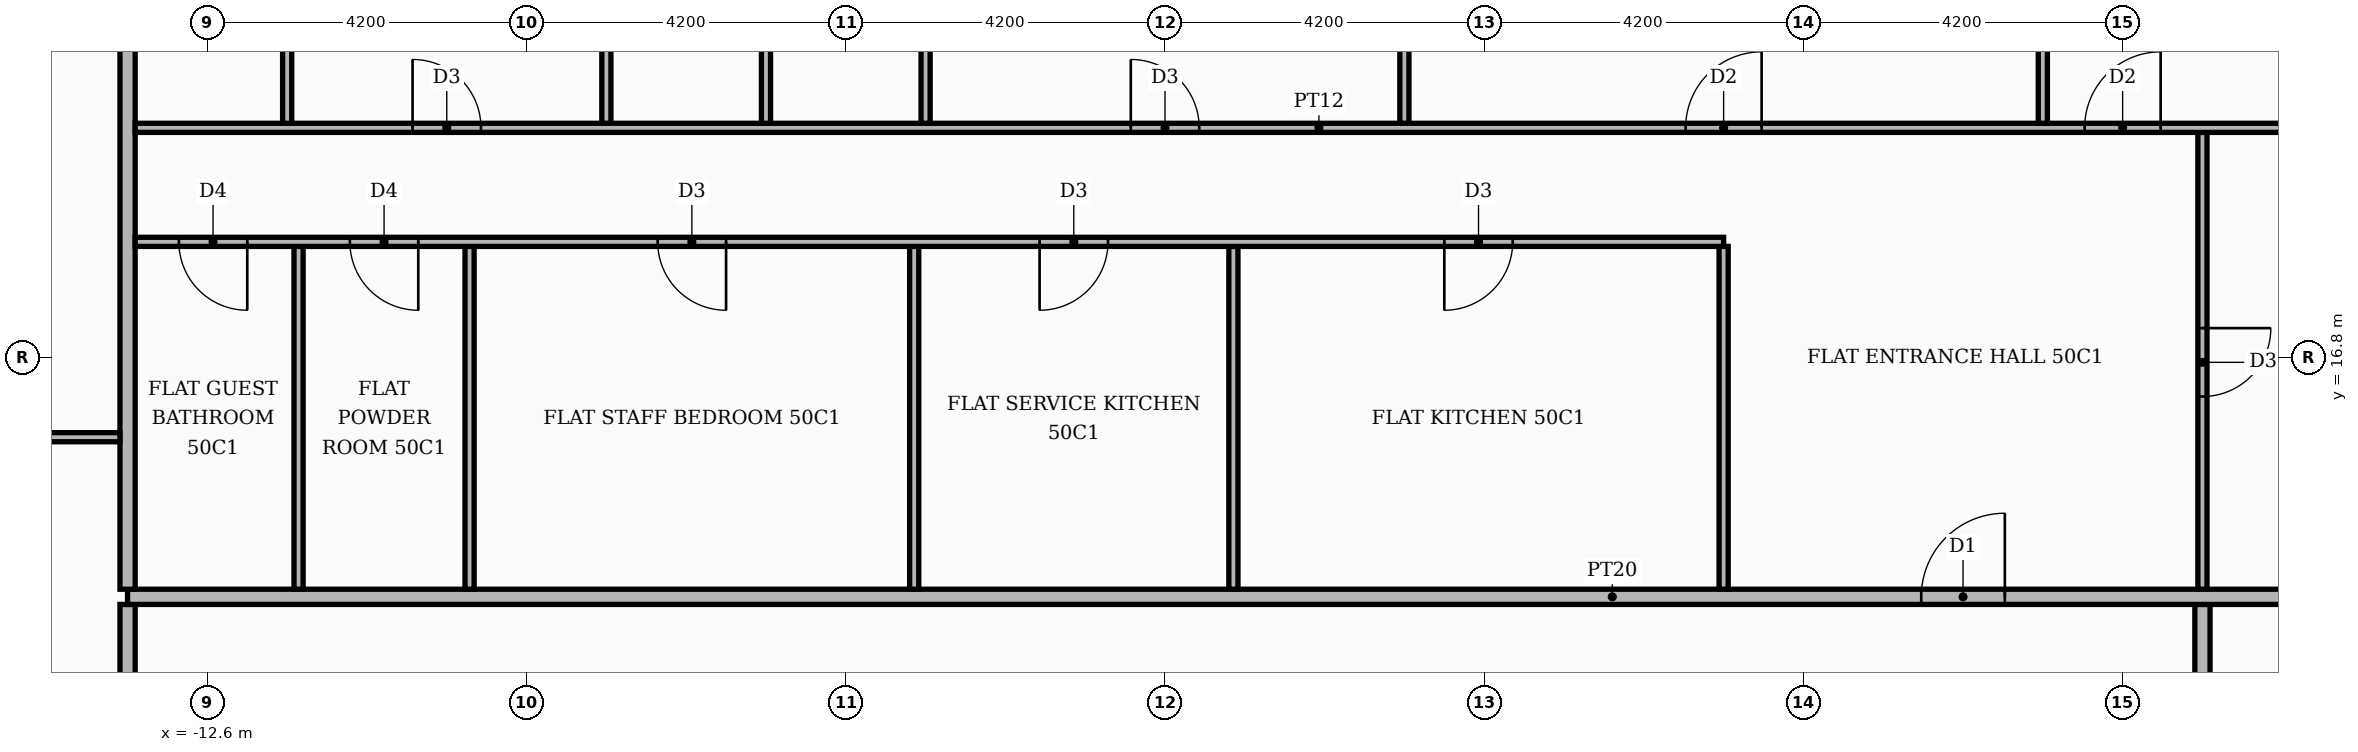
"""IFC4 building model, lengths in metres.
Left out: names, types, materials, properties, quantities, classifications, styles, units other than length and angle.
Written with IfcOpenShell. Run it as: python <this file> out.ifc"""

import sys

from ifc_helpers import new_model, si_unit, direction, frame, frame_2d, origin, place, context, subcontext, project, spatial, rectangle, extrude, element, fill, save


model = new_model("IFC4")
c1 = context("Model", 3, precision=1e-05, world=origin(), true_north=direction((0.0, 1.0)))
c2 = subcontext(c1, "Body", "Model", "MODEL_VIEW")
j1 = project(units=[si_unit("LENGTHUNIT", "METRE"), si_unit("PLANEANGLEUNIT", "RADIAN")], contexts=[c1])
p1 = place(None, origin())
s1 = spatial("IfcSite", under=j1, at=p1, CompositionType="ELEMENT")
p2 = place(p1, origin())
s2 = spatial("IfcBuilding", under=s1, at=p2, CompositionType="ELEMENT")
p3 = place(p2, frame((0.0, 0.0, 211.8)))
s3 = spatial("IfcBuildingStorey", under=s2, at=p3, CompositionType="ELEMENT", Elevation=211.8)
p4 = place(p3, frame((-13.65, 5.35, 0.0), z_axis=(0.0, 0.0, 1.0), x_axis=(0.0, 1.0, 0.0)))
e1 = element("IfcWall", 1, at=p4, inside=s3, PredefinedType="PARTITIONING", context=c2, shape_type="SweptSolid", body=[
    extrude(rectangle(XDim=8.2, YDim=0.2, at=frame_2d((4.1, 0.0))), origin(), (0.0, 0.0, 1.0), 3.48),
])
p5 = place(p4, frame((5.65, 0.0, 0.0)))
e2 = element("IfcOpeningElement", 2, at=p5, cuts=e1, PredefinedType="OPENING", context=c2, shape_type="SweptSolid", body=[
    extrude(rectangle(XDim=1.1, YDim=2.4, at=frame_2d((0.55, 1.2))), frame((0.0, 0.11, 0.0), z_axis=(0.0, -1.0, 0.0), x_axis=(1.0, 0.0, 0.0)), (0.0, 0.0, 1.0), 0.22),
])
p6 = place(p3, frame((13.65, 11.1, 0.0), z_axis=(0.0, 0.0, 1.0), x_axis=(0.0, 1.0, 0.0)))
e3 = element("IfcWall", 3, at=p6, inside=s3, PredefinedType="PARTITIONING", context=c2, shape_type="SweptSolid", body=[
    extrude(rectangle(XDim=2.45, YDim=0.2, at=frame_2d((1.225, 0.0))), origin(), (0.0, 0.0, 1.0), 3.48),
])
p7 = place(p3, frame((-13.65, 13.65, 0.0), z_axis=(0.0, 0.0, 1.0), x_axis=(1.0, 0.0, 0.0)))
e4 = element("IfcWall", 4, at=p7, inside=s3, PredefinedType="PARTITIONING", context=c2, shape_type="SweptSolid", body=[
    extrude(rectangle(XDim=39.07, YDim=0.2, at=frame_2d((19.535, 0.0))), origin(), (0.0, 0.0, 1.0), 3.48),
])
p8 = place(p7, frame((23.6, 0.0, 0.0)))
e5 = element("IfcOpeningElement", 5, at=p8, cuts=e4, PredefinedType="OPENING", context=c2, shape_type="SweptSolid", body=[
    extrude(rectangle(XDim=1.1, YDim=2.4, at=frame_2d((0.55, 1.2))), frame((0.0, 0.11, 0.0), z_axis=(0.0, -1.0, 0.0), x_axis=(1.0, 0.0, 0.0)), (0.0, 0.0, 1.0), 0.22),
])
p9 = place(p3, frame((-13.65, 13.75, 0.0), z_axis=(0.0, 0.0, 1.0), x_axis=(0.0, 1.0, 0.0)))
e6 = element("IfcWall", 6, at=p9, inside=s3, PredefinedType="PARTITIONING", context=c2, shape_type="SweptSolid", body=[
    extrude(rectangle(XDim=11.67, YDim=0.2, at=frame_2d((5.835, 0.0))), origin(), (0.0, 0.0, 1.0), 3.48),
])
for number, where, z_axis, x_axis in (
    (7, (-11.4, 13.75, 0.0), (0.0, 0.0, 1.0), (0.0, 1.0, 0.0)),
    (8, (-9.15, 13.75, 0.0), (0.0, 0.0, 1.0), (0.0, 1.0, 0.0)),
    (9, (-3.3, 13.75, 0.0), (0.0, 0.0, 1.0), (0.0, 1.0, 0.0)),
    (10, (0.9, 13.75, 0.0), (0.0, 0.0, 1.0), (0.0, 1.0, 0.0)),
    (11, (7.35, 13.75, 0.0), (0.0, 0.0, 1.0), (0.0, 1.0, 0.0)),
):
    element("IfcWall", number, at=place(p3, frame(where, z_axis=z_axis, x_axis=x_axis)), inside=s3, PredefinedType="PARTITIONING", context=c2, shape_type="SweptSolid", body=[
        extrude(rectangle(XDim=4.51, YDim=0.12, at=frame_2d((2.255, 0.0))), origin(), (0.0, 0.0, 1.0), 3.48),
    ])
p10 = place(p3, frame((13.65, 13.75, 0.0), z_axis=(0.0, 0.0, 1.0), x_axis=(0.0, 1.0, 0.0)))
e12 = element("IfcWall", 12, at=p10, inside=s3, PredefinedType="PARTITIONING", context=c2, shape_type="SweptSolid", body=[
    extrude(rectangle(XDim=6.01, YDim=0.12, at=frame_2d((3.005, 0.0))), origin(), (0.0, 0.0, 1.0), 3.48),
])
p11 = place(p10, frame((2.535, 0.0, 0.0)))
e13 = element("IfcOpeningElement", 13, at=p11, cuts=e12, PredefinedType="OPENING", context=c2, shape_type="SweptSolid", body=[
    extrude(rectangle(XDim=0.9, YDim=2.1, at=frame_2d((0.45, 1.05))), frame((0.0, 0.07, 0.0), z_axis=(0.0, -1.0, 0.0), x_axis=(1.0, 0.0, 0.0)), (0.0, 0.0, 1.0), 0.14),
])
p12 = place(p3, frame((-20.12, 15.75, 0.0), z_axis=(0.0, 0.0, 1.0), x_axis=(1.0, 0.0, 0.0)))
e14 = element("IfcWall", 14, at=p12, inside=s3, PredefinedType="PARTITIONING", context=c2, shape_type="SweptSolid", body=[
    extrude(rectangle(XDim=6.37, YDim=0.12, at=frame_2d((3.185, 0.0))), origin(), (0.0, 0.0, 1.0), 3.48),
])
p13 = place(p12, frame((2.735, 0.0, 0.0)))
e15 = element("IfcOpeningElement", 15, at=p13, cuts=e14, PredefinedType="OPENING", context=c2, shape_type="SweptSolid", body=[
    extrude(rectangle(XDim=1.0, YDim=2.1, at=frame_2d((0.5, 1.05))), frame((0.0, 0.07, 0.0), z_axis=(0.0, -1.0, 0.0), x_axis=(1.0, 0.0, 0.0)), (0.0, 0.0, 1.0), 0.14),
])
p14 = place(p3, frame((-13.55, 18.32, 0.0), z_axis=(0.0, 0.0, 1.0), x_axis=(1.0, 0.0, 0.0)))
e16 = element("IfcWall", 16, at=p14, inside=s3, PredefinedType="PARTITIONING", context=c2, shape_type="SweptSolid", body=[
    extrude(rectangle(XDim=20.9, YDim=0.12, at=frame_2d((10.45, 0.0))), origin(), (0.0, 0.0, 1.0), 3.48),
])
p15 = place(p14, frame((17.225, 0.0, 0.0)))
e17 = element("IfcOpeningElement", 17, at=p15, cuts=e16, PredefinedType="OPENING", context=c2, shape_type="SweptSolid", body=[
    extrude(rectangle(XDim=0.9, YDim=2.1, at=frame_2d((0.45, 1.05))), frame((0.0, 0.07, 0.0), z_axis=(0.0, -1.0, 0.0), x_axis=(1.0, 0.0, 0.0)), (0.0, 0.0, 1.0), 0.14),
])
p16 = place(p14, frame((11.9, 0.0, 0.0)))
e18 = element("IfcOpeningElement", 18, at=p16, cuts=e16, PredefinedType="OPENING", context=c2, shape_type="SweptSolid", body=[
    extrude(rectangle(XDim=0.9, YDim=2.1, at=frame_2d((0.45, 1.05))), frame((0.0, 0.07, 0.0), z_axis=(0.0, -1.0, 0.0), x_axis=(1.0, 0.0, 0.0)), (0.0, 0.0, 1.0), 0.14),
])
p17 = place(p14, frame((6.875, 0.0, 0.0)))
e19 = element("IfcOpeningElement", 19, at=p17, cuts=e16, PredefinedType="OPENING", context=c2, shape_type="SweptSolid", body=[
    extrude(rectangle(XDim=0.9, YDim=2.1, at=frame_2d((0.45, 1.05))), frame((0.0, 0.07, 0.0), z_axis=(0.0, -1.0, 0.0), x_axis=(1.0, 0.0, 0.0)), (0.0, 0.0, 1.0), 0.14),
])
p18 = place(p14, frame((2.825, 0.0, 0.0)))
e20 = element("IfcOpeningElement", 20, at=p18, cuts=e16, PredefinedType="OPENING", context=c2, shape_type="SweptSolid", body=[
    extrude(rectangle(XDim=0.9, YDim=2.1, at=frame_2d((0.45, 1.05))), frame((0.0, 0.07, 0.0), z_axis=(0.0, -1.0, 0.0), x_axis=(1.0, 0.0, 0.0)), (0.0, 0.0, 1.0), 0.14),
])
p19 = place(p14, frame((0.575, 0.0, 0.0)))
e21 = element("IfcOpeningElement", 21, at=p19, cuts=e16, PredefinedType="OPENING", context=c2, shape_type="SweptSolid", body=[
    extrude(rectangle(XDim=0.9, YDim=2.1, at=frame_2d((0.45, 1.05))), frame((0.0, 0.07, 0.0), z_axis=(0.0, -1.0, 0.0), x_axis=(1.0, 0.0, 0.0)), (0.0, 0.0, 1.0), 0.14),
])
p20 = place(p3, frame((-13.55, 19.82, 0.0), z_axis=(0.0, 0.0, 1.0), x_axis=(1.0, 0.0, 0.0)))
e22 = element("IfcWall", 22, at=p20, inside=s3, PredefinedType="PARTITIONING", context=c2, shape_type="SweptSolid", body=[
    extrude(rectangle(XDim=31.15, YDim=0.12, at=frame_2d((15.575, 0.0))), origin(), (0.0, 0.0, 1.0), 3.48),
])
p21 = place(p20, frame((25.65, 0.0, 0.0)))
e23 = element("IfcOpeningElement", 23, at=p21, cuts=e22, PredefinedType="OPENING", context=c2, shape_type="SweptSolid", body=[
    extrude(rectangle(XDim=1.0, YDim=2.1, at=frame_2d((0.5, 1.05))), frame((0.0, 0.07, 0.0), z_axis=(0.0, -1.0, 0.0), x_axis=(1.0, 0.0, 0.0)), (0.0, 0.0, 1.0), 0.14),
])
p22 = place(p20, frame((20.4, 0.0, 0.0)))
e24 = element("IfcOpeningElement", 24, at=p22, cuts=e22, PredefinedType="OPENING", context=c2, shape_type="SweptSolid", body=[
    extrude(rectangle(XDim=1.0, YDim=2.1, at=frame_2d((0.5, 1.05))), frame((0.0, 0.07, 0.0), z_axis=(0.0, -1.0, 0.0), x_axis=(1.0, 0.0, 0.0)), (0.0, 0.0, 1.0), 0.14),
])
p23 = place(p20, frame((13.1, 0.0, 0.0)))
e25 = element("IfcOpeningElement", 25, at=p23, cuts=e22, PredefinedType="OPENING", context=c2, shape_type="SweptSolid", body=[
    extrude(rectangle(XDim=0.9, YDim=2.1, at=frame_2d((0.45, 1.05))), frame((0.0, 0.07, 0.0), z_axis=(0.0, -1.0, 0.0), x_axis=(1.0, 0.0, 0.0)), (0.0, 0.0, 1.0), 0.14),
])
p24 = place(p20, frame((3.65, 0.0, 0.0)))
e26 = element("IfcOpeningElement", 26, at=p24, cuts=e22, PredefinedType="OPENING", context=c2, shape_type="SweptSolid", body=[
    extrude(rectangle(XDim=0.9, YDim=2.1, at=frame_2d((0.45, 1.05))), frame((0.0, 0.07, 0.0), z_axis=(0.0, -1.0, 0.0), x_axis=(1.0, 0.0, 0.0)), (0.0, 0.0, 1.0), 0.14),
])
p25 = place(p3, frame((-11.55, 19.88, 0.0), z_axis=(0.0, 0.0, 1.0), x_axis=(0.0, 1.0, 0.0)))
e27 = element("IfcWall", 27, at=p25, inside=s3, PredefinedType="PARTITIONING", context=c2, shape_type="SweptSolid", body=[
    extrude(rectangle(XDim=5.54, YDim=0.12, at=frame_2d((2.77, 0.0))), origin(), (0.0, 0.0, 1.0), 3.48),
])
p26 = place(p25, frame((2.44, 0.0, 0.0)))
e28 = element("IfcOpeningElement", 28, at=p26, cuts=e27, PredefinedType="OPENING", context=c2, shape_type="SweptSolid", body=[
    extrude(rectangle(XDim=0.9, YDim=2.1, at=frame_2d((0.45, 1.05))), frame((0.0, 0.07, 0.0), z_axis=(0.0, -1.0, 0.0), x_axis=(1.0, 0.0, 0.0)), (0.0, 0.0, 1.0), 0.14),
])
p27 = place(p3, frame((-7.35, 19.88, 0.0), z_axis=(0.0, 0.0, 1.0), x_axis=(0.0, 1.0, 0.0)))
e29 = element("IfcWall", 29, at=p27, inside=s3, PredefinedType="PARTITIONING", context=c2, shape_type="SweptSolid", body=[
    extrude(rectangle(XDim=5.54, YDim=0.12, at=frame_2d((2.77, 0.0))), origin(), (0.0, 0.0, 1.0), 3.48),
])
p28 = place(p3, frame((-5.25, 19.88, 0.0), z_axis=(0.0, 0.0, 1.0), x_axis=(0.0, 1.0, 0.0)))
e30 = element("IfcWall", 30, at=p28, inside=s3, PredefinedType="PARTITIONING", context=c2, shape_type="SweptSolid", body=[
    extrude(rectangle(XDim=5.54, YDim=0.12, at=frame_2d((2.77, 0.0))), origin(), (0.0, 0.0, 1.0), 3.48),
])
p29 = place(p28, frame((2.44, 0.0, 0.0)))
e31 = element("IfcOpeningElement", 31, at=p29, cuts=e30, PredefinedType="OPENING", context=c2, shape_type="SweptSolid", body=[
    extrude(rectangle(XDim=0.9, YDim=2.1, at=frame_2d((0.45, 1.05))), frame((0.0, 0.07, 0.0), z_axis=(0.0, -1.0, 0.0), x_axis=(1.0, 0.0, 0.0)), (0.0, 0.0, 1.0), 0.14),
])
p30 = place(p3, frame((-3.15, 19.88, 0.0), z_axis=(0.0, 0.0, 1.0), x_axis=(0.0, 1.0, 0.0)))
e32 = element("IfcWall", 32, at=p30, inside=s3, PredefinedType="PARTITIONING", context=c2, shape_type="SweptSolid", body=[
    extrude(rectangle(XDim=5.54, YDim=0.12, at=frame_2d((2.77, 0.0))), origin(), (0.0, 0.0, 1.0), 3.48),
])
p31 = place(p30, frame((2.44, 0.0, 0.0)))
e33 = element("IfcOpeningElement", 33, at=p31, cuts=e32, PredefinedType="OPENING", context=c2, shape_type="SweptSolid", body=[
    extrude(rectangle(XDim=0.9, YDim=2.1, at=frame_2d((0.45, 1.05))), frame((0.0, 0.07, 0.0), z_axis=(0.0, -1.0, 0.0), x_axis=(1.0, 0.0, 0.0)), (0.0, 0.0, 1.0), 0.14),
])
for number, where, z_axis, x_axis in (
    (34, (3.15, 19.88, 0.0), (0.0, 0.0, 1.0), (0.0, 1.0, 0.0)),
    (35, (11.55, 19.88, 0.0), (0.0, 0.0, 1.0), (0.0, 1.0, 0.0)),
):
    element("IfcWall", number, at=place(p3, frame(where, z_axis=z_axis, x_axis=x_axis)), inside=s3, PredefinedType="PARTITIONING", context=c2, shape_type="SweptSolid", body=[
        extrude(rectangle(XDim=5.54, YDim=0.12, at=frame_2d((2.77, 0.0))), origin(), (0.0, 0.0, 1.0), 3.48),
    ])
p32 = place(p8, origin())
e36 = element("IfcDoor", 36, at=p32, inside=s3, OperationType="SINGLE_SWING_RIGHT", PredefinedType="DOOR", context=c2, shape_type="SweptSolid", body=[
    extrude(rectangle(XDim=1.1, YDim=2.4, at=frame_2d((0.55, 1.2))), frame((0.0, 0.025, 0.0), z_axis=(0.0, -1.0, 0.0), x_axis=(1.0, 0.0, 0.0)), (0.0, 0.0, 1.0), 0.05),
])
fill(e5, e36)
p33 = place(p11, frame((0.9, 0.0, 0.0), z_axis=(0.0, 0.0, 1.0), x_axis=(-1.0, 0.0, 0.0)))
e37 = element("IfcDoor", 37, at=p33, inside=s3, OperationType="SINGLE_SWING_RIGHT", PredefinedType="DOOR", context=c2, shape_type="SweptSolid", body=[
    extrude(rectangle(XDim=0.9, YDim=2.1, at=frame_2d((0.45, 1.05))), frame((0.0, 0.025, 0.0), z_axis=(0.0, -1.0, 0.0), x_axis=(1.0, 0.0, 0.0)), (0.0, 0.0, 1.0), 0.05),
])
fill(e13, e37)
p34 = place(p15, frame((0.9, 0.0, 0.0), z_axis=(0.0, 0.0, 1.0), x_axis=(-1.0, 0.0, 0.0)))
e38 = element("IfcDoor", 38, at=p34, inside=s3, OperationType="SINGLE_SWING_LEFT", PredefinedType="DOOR", context=c2, shape_type="SweptSolid", body=[
    extrude(rectangle(XDim=0.9, YDim=2.1, at=frame_2d((0.45, 1.05))), frame((0.0, 0.025, 0.0), z_axis=(0.0, -1.0, 0.0), x_axis=(1.0, 0.0, 0.0)), (0.0, 0.0, 1.0), 0.05),
])
fill(e17, e38)
p35 = place(p16, frame((0.9, 0.0, 0.0), z_axis=(0.0, 0.0, 1.0), x_axis=(-1.0, 0.0, 0.0)))
e39 = element("IfcDoor", 39, at=p35, inside=s3, OperationType="SINGLE_SWING_LEFT", PredefinedType="DOOR", context=c2, shape_type="SweptSolid", body=[
    extrude(rectangle(XDim=0.9, YDim=2.1, at=frame_2d((0.45, 1.05))), frame((0.0, 0.025, 0.0), z_axis=(0.0, -1.0, 0.0), x_axis=(1.0, 0.0, 0.0)), (0.0, 0.0, 1.0), 0.05),
])
fill(e18, e39)
p36 = place(p17, frame((0.9, 0.0, 0.0), z_axis=(0.0, 0.0, 1.0), x_axis=(-1.0, 0.0, 0.0)))
e40 = element("IfcDoor", 40, at=p36, inside=s3, OperationType="SINGLE_SWING_RIGHT", PredefinedType="DOOR", context=c2, shape_type="SweptSolid", body=[
    extrude(rectangle(XDim=0.9, YDim=2.1, at=frame_2d((0.45, 1.05))), frame((0.0, 0.025, 0.0), z_axis=(0.0, -1.0, 0.0), x_axis=(1.0, 0.0, 0.0)), (0.0, 0.0, 1.0), 0.05),
])
fill(e19, e40)
p37 = place(p18, frame((0.9, 0.0, 0.0), z_axis=(0.0, 0.0, 1.0), x_axis=(-1.0, 0.0, 0.0)))
e41 = element("IfcDoor", 41, at=p37, inside=s3, OperationType="SINGLE_SWING_RIGHT", PredefinedType="DOOR", context=c2, shape_type="SweptSolid", body=[
    extrude(rectangle(XDim=0.9, YDim=2.1, at=frame_2d((0.45, 1.05))), frame((0.0, 0.025, 0.0), z_axis=(0.0, -1.0, 0.0), x_axis=(1.0, 0.0, 0.0)), (0.0, 0.0, 1.0), 0.05),
])
fill(e20, e41)
p38 = place(p19, frame((0.9, 0.0, 0.0), z_axis=(0.0, 0.0, 1.0), x_axis=(-1.0, 0.0, 0.0)))
e42 = element("IfcDoor", 42, at=p38, inside=s3, OperationType="SINGLE_SWING_RIGHT", PredefinedType="DOOR", context=c2, shape_type="SweptSolid", body=[
    extrude(rectangle(XDim=0.9, YDim=2.1, at=frame_2d((0.45, 1.05))), frame((0.0, 0.025, 0.0), z_axis=(0.0, -1.0, 0.0), x_axis=(1.0, 0.0, 0.0)), (0.0, 0.0, 1.0), 0.05),
])
fill(e21, e42)
p39 = place(p21, origin())
e43 = element("IfcDoor", 43, at=p39, inside=s3, OperationType="SINGLE_SWING_RIGHT", PredefinedType="DOOR", context=c2, shape_type="SweptSolid", body=[
    extrude(rectangle(XDim=1.0, YDim=2.1, at=frame_2d((0.5, 1.05))), frame((0.0, 0.025, 0.0), z_axis=(0.0, -1.0, 0.0), x_axis=(1.0, 0.0, 0.0)), (0.0, 0.0, 1.0), 0.05),
])
fill(e23, e43)
p40 = place(p22, origin())
e44 = element("IfcDoor", 44, at=p40, inside=s3, OperationType="SINGLE_SWING_RIGHT", PredefinedType="DOOR", context=c2, shape_type="SweptSolid", body=[
    extrude(rectangle(XDim=1.0, YDim=2.1, at=frame_2d((0.5, 1.05))), frame((0.0, 0.025, 0.0), z_axis=(0.0, -1.0, 0.0), x_axis=(1.0, 0.0, 0.0)), (0.0, 0.0, 1.0), 0.05),
])
fill(e24, e44)
p41 = place(p23, origin())
e45 = element("IfcDoor", 45, at=p41, inside=s3, OperationType="SINGLE_SWING_LEFT", PredefinedType="DOOR", context=c2, shape_type="SweptSolid", body=[
    extrude(rectangle(XDim=0.9, YDim=2.1, at=frame_2d((0.45, 1.05))), frame((0.0, 0.025, 0.0), z_axis=(0.0, -1.0, 0.0), x_axis=(1.0, 0.0, 0.0)), (0.0, 0.0, 1.0), 0.05),
])
fill(e25, e45)
p42 = place(p24, origin())
e46 = element("IfcDoor", 46, at=p42, inside=s3, OperationType="SINGLE_SWING_LEFT", PredefinedType="DOOR", context=c2, shape_type="SweptSolid", body=[
    extrude(rectangle(XDim=0.9, YDim=2.1, at=frame_2d((0.45, 1.05))), frame((0.0, 0.025, 0.0), z_axis=(0.0, -1.0, 0.0), x_axis=(1.0, 0.0, 0.0)), (0.0, 0.0, 1.0), 0.05),
])
fill(e26, e46)
save(model, sys.argv[1])
